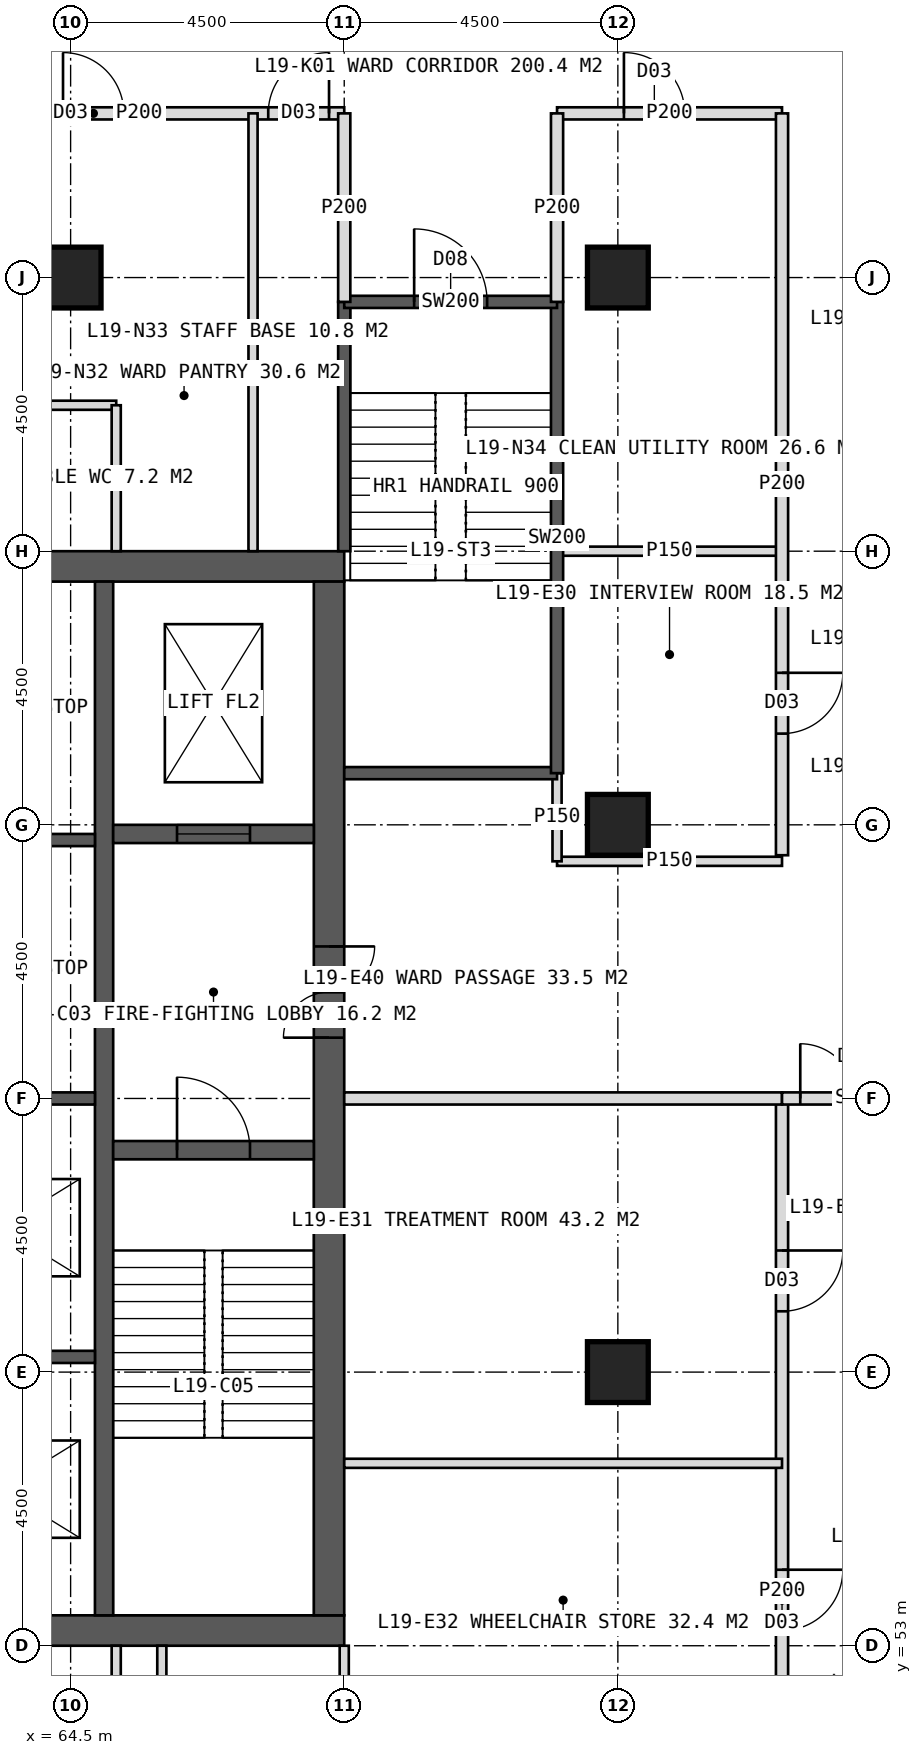
"""IFC4 building model, lengths in metres.
Left out: names, types, materials, properties, quantities, classifications, styles, units other than length and angle.
Written with IfcOpenShell. Run it as: python <this file> out.ifc"""

import sys

from ifc_helpers import new_model, si_unit, direction, frame, frame_2d, origin, origin_2d, place, context, subcontext, project, spatial, rectangle, hollow_rectangle, extrude, element, fill, save


model = new_model("IFC4")
c1 = context("Model", 3, precision=1e-05, world=origin(), true_north=direction((0.0, 1.0)))
c2 = subcontext(c1, "Body", "Model", "MODEL_VIEW")
j1 = project(units=[si_unit("LENGTHUNIT", "METRE"), si_unit("PLANEANGLEUNIT", "RADIAN")], contexts=[c1])
p1 = place(None, origin())
s1 = spatial("IfcSite", under=j1, at=p1, CompositionType="ELEMENT")
p2 = place(p1, origin())
s2 = spatial("IfcBuilding", under=s1, at=p2, CompositionType="ELEMENT")
p3 = place(p2, frame((0.0, 0.0, 83.0)))
s3 = spatial("IfcBuildingStorey", under=s2, at=p3, CompositionType="ELEMENT", Elevation=83.0)
p4 = place(p3, frame((51.0, 70.75, 0.0), z_axis=(0.0, 0.0, 1.0), x_axis=(1.0, 0.0, 0.0)))
e1 = element("IfcWall", 1, at=p4, inside=s3, PredefinedType="SHEAR", context=c2, shape_type="SweptSolid", body=[
    extrude(rectangle(XDim=18.0, YDim=0.5, at=frame_2d((9.0, 0.0))), origin(), (0.0, 0.0, 1.0), 4.0),
])
p5 = place(p4, frame((8.1, 0.0, 0.0)))
e2 = element("IfcOpeningElement", 2, at=p5, cuts=e1, PredefinedType="OPENING", context=c2, shape_type="SweptSolid", body=[
    extrude(rectangle(XDim=1.8, YDim=2.2, at=frame_2d((0.9, 1.1))), frame((0.0, 0.26, 0.0), z_axis=(0.0, -1.0, 0.0), x_axis=(1.0, 0.0, 0.0)), (0.0, 0.0, 1.0), 0.52),
])
p6 = place(p3, frame((51.0, 53.25, 0.0), z_axis=(0.0, 0.0, 1.0), x_axis=(1.0, 0.0, 0.0)))
e3 = element("IfcWall", 3, at=p6, inside=s3, PredefinedType="SHEAR", context=c2, shape_type="SweptSolid", body=[
    extrude(rectangle(XDim=18.0, YDim=0.5, at=frame_2d((9.0, 0.0))), origin(), (0.0, 0.0, 1.0), 4.0),
])
p7 = place(p6, frame((8.1, 0.0, 0.0)))
e4 = element("IfcOpeningElement", 4, at=p7, cuts=e3, PredefinedType="OPENING", context=c2, shape_type="SweptSolid", body=[
    extrude(rectangle(XDim=1.8, YDim=2.2, at=frame_2d((0.9, 1.1))), frame((0.0, 0.26, 0.0), z_axis=(0.0, -1.0, 0.0), x_axis=(1.0, 0.0, 0.0)), (0.0, 0.0, 1.0), 0.52),
])
p8 = place(p3, frame((68.75, 53.5, 0.0), z_axis=(0.0, 0.0, 1.0), x_axis=(0.0, 1.0, 0.0)))
e5 = element("IfcWall", 5, at=p8, inside=s3, PredefinedType="SHEAR", context=c2, shape_type="SweptSolid", body=[
    extrude(rectangle(XDim=17.0, YDim=0.5, at=frame_2d((8.5, 0.0))), origin(), (0.0, 0.0, 1.0), 4.0),
])
p9 = place(p8, frame((9.5, 0.0, 0.0)))
e6 = element("IfcOpeningElement", 6, at=p9, cuts=e5, PredefinedType="OPENING", context=c2, shape_type="SweptSolid", body=[
    extrude(rectangle(XDim=1.5, YDim=2.2, at=frame_2d((0.75, 1.1))), frame((0.0, 0.26, 0.0), z_axis=(0.0, -1.0, 0.0), x_axis=(1.0, 0.0, 0.0)), (0.0, 0.0, 1.0), 0.52),
])
p10 = place(p3, frame((65.05, 53.5, 0.0), z_axis=(0.0, 0.0, 1.0), x_axis=(0.0, 1.0, 0.0)))
e7 = element("IfcWall", 7, at=p10, inside=s3, PredefinedType="SHEAR", context=c2, shape_type="SweptSolid", body=[
    extrude(rectangle(XDim=17.0, YDim=0.3, at=frame_2d((8.5, 0.0))), origin(), (0.0, 0.0, 1.0), 4.0),
])
for number, where, z_axis, x_axis in (
    (8, (61.85, 57.75, 0.0), (0.0, 0.0, 1.0), (1.0, 0.0, 0.0)),
    (9, (61.85, 62.0, 0.0), (0.0, 0.0, 1.0), (1.0, 0.0, 0.0)),
    (10, (61.85, 66.25, 0.0), (0.0, 0.0, 1.0), (1.0, 0.0, 0.0)),
):
    element("IfcWall", number, at=place(p3, frame(where, z_axis=z_axis, x_axis=x_axis)), inside=s3, PredefinedType="SHEAR", context=c2, shape_type="SweptSolid", body=[
        extrude(rectangle(XDim=3.05, YDim=0.2, at=frame_2d((1.525, 0.0))), origin(), (0.0, 0.0, 1.0), 4.0),
    ])
p11 = place(p3, frame((65.2, 61.15, 0.0), z_axis=(0.0, 0.0, 1.0), x_axis=(1.0, 0.0, 0.0)))
e11 = element("IfcWall", 11, at=p11, inside=s3, PredefinedType="SHEAR", context=c2, shape_type="SweptSolid", body=[
    extrude(rectangle(XDim=3.3, YDim=0.3, at=frame_2d((1.65, 0.0))), origin(), (0.0, 0.0, 1.0), 4.0),
])
p12 = place(p11, frame((1.05, 0.0, 0.0)))
e12 = element("IfcOpeningElement", 12, at=p12, cuts=e11, PredefinedType="OPENING", context=c2, shape_type="SweptSolid", body=[
    extrude(rectangle(XDim=1.2, YDim=2.1, at=frame_2d((0.6, 1.05))), frame((0.0, 0.16, 0.0), z_axis=(0.0, -1.0, 0.0), x_axis=(1.0, 0.0, 0.0)), (0.0, 0.0, 1.0), 0.32),
])
p13 = place(p3, frame((65.2, 66.35, 0.0), z_axis=(0.0, 0.0, 1.0), x_axis=(1.0, 0.0, 0.0)))
e13 = element("IfcWall", 13, at=p13, inside=s3, PredefinedType="SHEAR", context=c2, shape_type="SweptSolid", body=[
    extrude(rectangle(XDim=3.3, YDim=0.3, at=frame_2d((1.65, 0.0))), origin(), (0.0, 0.0, 1.0), 4.0),
])
p14 = place(p13, frame((1.05, 0.0, 0.0)))
e14 = element("IfcOpeningElement", 14, at=p14, cuts=e13, PredefinedType="OPENING", context=c2, shape_type="SweptSolid", body=[
    extrude(rectangle(XDim=1.2, YDim=2.2, at=frame_2d((0.6, 1.1))), frame((0.0, 0.16, 0.0), z_axis=(0.0, -1.0, 0.0), x_axis=(1.0, 0.0, 0.0)), (0.0, 0.0, 1.0), 0.32),
])
for number, where, z_axis, x_axis in (
    (15, (73.5, 75.5, 0.0), (0.0, 0.0, 1.0), (1.0, 0.0, 0.0)),
    (16, (64.5, 75.5, 0.0), (0.0, 0.0, 1.0), (1.0, 0.0, 0.0)),
    (17, (73.5, 57.5, 0.0), (0.0, 0.0, 1.0), (1.0, 0.0, 0.0)),
    (18, (73.5, 66.5, 0.0), (0.0, 0.0, 1.0), (1.0, 0.0, 0.0)),
):
    element("IfcColumn", number, at=place(p3, frame(where, z_axis=z_axis, x_axis=x_axis)), inside=s3, PredefinedType="COLUMN", context=c2, shape_type="SweptSolid", body=[
        extrude(hollow_rectangle(XDim=1.0, YDim=1.0, WallThickness=0.1, at=origin_2d()), origin(), (0.0, 0.0, 1.0), 4.0),
    ])
p15 = place(p3, frame((62.25, 78.2, 0.0), z_axis=(0.0, 0.0, 1.0), x_axis=(1.0, 0.0, 0.0)))
e19 = element("IfcWall", 19, at=p15, inside=s3, PredefinedType="PARTITIONING", context=c2, shape_type="SweptSolid", body=[
    extrude(rectangle(XDim=6.75, YDim=0.2, at=frame_2d((3.375, 0.0))), origin(), (0.0, 0.0, 1.0), 3.75),
])
p16 = place(p15, frame((2.125, 0.0, 0.0)))
e20 = element("IfcOpeningElement", 20, at=p16, cuts=e19, PredefinedType="OPENING", context=c2, shape_type="SweptSolid", body=[
    extrude(rectangle(XDim=1.0, YDim=2.1, at=frame_2d((0.5, 1.05))), frame((0.0, 0.11, 0.0), z_axis=(0.0, -1.0, 0.0), x_axis=(1.0, 0.0, 0.0)), (0.0, 0.0, 1.0), 0.22),
])
p17 = place(p15, frame((5.5, 0.0, 0.0)))
e21 = element("IfcOpeningElement", 21, at=p17, cuts=e19, PredefinedType="OPENING", context=c2, shape_type="SweptSolid", body=[
    extrude(rectangle(XDim=1.0, YDim=2.1, at=frame_2d((0.5, 1.05))), frame((0.0, 0.11, 0.0), z_axis=(0.0, -1.0, 0.0), x_axis=(1.0, 0.0, 0.0)), (0.0, 0.0, 1.0), 0.22),
])
p18 = place(p3, frame((72.5, 78.2, 0.0), z_axis=(0.0, 0.0, 1.0), x_axis=(1.0, 0.0, 0.0)))
e22 = element("IfcWall", 22, at=p18, inside=s3, PredefinedType="PARTITIONING", context=c2, shape_type="SweptSolid", body=[
    extrude(rectangle(XDim=3.7, YDim=0.2, at=frame_2d((1.85, 0.0))), origin(), (0.0, 0.0, 1.0), 3.75),
])
p19 = place(p18, frame((1.1, 0.0, 0.0)))
e23 = element("IfcOpeningElement", 23, at=p19, cuts=e22, PredefinedType="OPENING", context=c2, shape_type="SweptSolid", body=[
    extrude(rectangle(XDim=1.0, YDim=2.1, at=frame_2d((0.5, 1.05))), frame((0.0, 0.11, 0.0), z_axis=(0.0, -1.0, 0.0), x_axis=(1.0, 0.0, 0.0)), (0.0, 0.0, 1.0), 0.22),
])
p20 = place(p3, frame((67.5, 71.0, 0.0), z_axis=(0.0, 0.0, 1.0), x_axis=(0.0, 1.0, 0.0)))
e24 = element("IfcWall", 24, at=p20, inside=s3, PredefinedType="PARTITIONING", context=c2, shape_type="SweptSolid", body=[
    extrude(rectangle(XDim=7.2, YDim=0.15, at=frame_2d((3.6, 0.0))), origin(), (0.0, 0.0, 1.0), 3.75),
])
p21 = place(p3, frame((62.25, 73.4, 0.0), z_axis=(0.0, 0.0, 1.0), x_axis=(1.0, 0.0, 0.0)))
e25 = element("IfcWall", 25, at=p21, inside=s3, PredefinedType="PARTITIONING", context=c2, shape_type="SweptSolid", body=[
    extrude(rectangle(XDim=3.0, YDim=0.15, at=frame_2d((1.5, 0.0))), origin(), (0.0, 0.0, 1.0), 3.75),
])
p22 = place(p3, frame((65.25, 71.0, 0.0), z_axis=(0.0, 0.0, 1.0), x_axis=(0.0, 1.0, 0.0)))
e26 = element("IfcWall", 26, at=p22, inside=s3, PredefinedType="PARTITIONING", context=c2, shape_type="SweptSolid", body=[
    extrude(rectangle(XDim=2.4, YDim=0.15, at=frame_2d((1.2, 0.0))), origin(), (0.0, 0.0, 1.0), 3.75),
])
for number, where, z_axis, x_axis in (
    (27, (69.0, 53.0, 0.0), (0.0, 0.0, 1.0), (0.0, -1.0, 0.0)),
    (28, (66.0, 53.0, 0.0), (0.0, 0.0, 1.0), (0.0, -1.0, 0.0)),
):
    element("IfcWall", number, at=place(p3, frame(where, z_axis=z_axis, x_axis=x_axis)), inside=s3, PredefinedType="PARTITIONING", context=c2, shape_type="SweptSolid", body=[
        extrude(rectangle(XDim=7.2, YDim=0.15, at=frame_2d((3.6, 0.0))), origin(), (0.0, 0.0, 1.0), 3.75),
    ])
p23 = place(p3, frame((65.25, 53.0, 0.0), z_axis=(0.0, 0.0, 1.0), x_axis=(0.0, -1.0, 0.0)))
e29 = element("IfcWall", 29, at=p23, inside=s3, PredefinedType="PARTITIONING", context=c2, shape_type="SweptSolid", body=[
    extrude(rectangle(XDim=2.4, YDim=0.15, at=frame_2d((1.2, 0.0))), origin(), (0.0, 0.0, 1.0), 3.75),
])
p24 = place(p3, frame((72.5, 71.0, 0.0), z_axis=(0.0, 0.0, 1.0), x_axis=(1.0, 0.0, 0.0)))
e30 = element("IfcWall", 30, at=p24, inside=s3, PredefinedType="PARTITIONING", context=c2, shape_type="SweptSolid", body=[
    extrude(rectangle(XDim=3.7, YDim=0.15, at=frame_2d((1.85, 0.0))), origin(), (0.0, 0.0, 1.0), 3.75),
])
p25 = place(p3, frame((76.2, 78.2, 0.0), z_axis=(0.0, 0.0, 1.0), x_axis=(0.0, -1.0, 0.0)))
e31 = element("IfcWall", 31, at=p25, inside=s3, PredefinedType="PARTITIONING", context=c2, shape_type="SweptSolid", body=[
    extrude(rectangle(XDim=12.2, YDim=0.2, at=frame_2d((6.1, 0.0))), origin(), (0.0, 0.0, 1.0), 3.75),
])
p26 = place(p25, frame((9.2, 0.0, 0.0)))
e32 = element("IfcOpeningElement", 32, at=p26, cuts=e31, PredefinedType="OPENING", context=c2, shape_type="SweptSolid", body=[
    extrude(rectangle(XDim=1.0, YDim=2.1, at=frame_2d((0.5, 1.05))), frame((0.0, 0.11, 0.0), z_axis=(0.0, -1.0, 0.0), x_axis=(1.0, 0.0, 0.0)), (0.0, 0.0, 1.0), 0.22),
])
p27 = place(p3, frame((76.2, 62.0, 0.0), z_axis=(0.0, 0.0, 1.0), x_axis=(0.0, -1.0, 0.0)))
e33 = element("IfcWall", 33, at=p27, inside=s3, PredefinedType="PARTITIONING", context=c2, shape_type="SweptSolid", body=[
    extrude(rectangle(XDim=16.2, YDim=0.2, at=frame_2d((8.1, 0.0))), origin(), (0.0, 0.0, 1.0), 3.75),
])
p28 = place(p27, frame((2.5, 0.0, 0.0)))
e34 = element("IfcOpeningElement", 34, at=p28, cuts=e33, PredefinedType="OPENING", context=c2, shape_type="SweptSolid", body=[
    extrude(rectangle(XDim=1.0, YDim=2.1, at=frame_2d((0.5, 1.05))), frame((0.0, 0.11, 0.0), z_axis=(0.0, -1.0, 0.0), x_axis=(1.0, 0.0, 0.0)), (0.0, 0.0, 1.0), 0.22),
])
p29 = place(p27, frame((7.75, 0.0, 0.0)))
e35 = element("IfcOpeningElement", 35, at=p29, cuts=e33, PredefinedType="OPENING", context=c2, shape_type="SweptSolid", body=[
    extrude(rectangle(XDim=1.0, YDim=2.1, at=frame_2d((0.5, 1.05))), frame((0.0, 0.11, 0.0), z_axis=(0.0, -1.0, 0.0), x_axis=(1.0, 0.0, 0.0)), (0.0, 0.0, 1.0), 0.22),
])
p30 = place(p27, frame((12.85, 0.0, 0.0)))
e36 = element("IfcOpeningElement", 36, at=p30, cuts=e33, PredefinedType="OPENING", context=c2, shape_type="SweptSolid", body=[
    extrude(rectangle(XDim=1.0, YDim=2.1, at=frame_2d((0.5, 1.05))), frame((0.0, 0.11, 0.0), z_axis=(0.0, -1.0, 0.0), x_axis=(1.0, 0.0, 0.0)), (0.0, 0.0, 1.0), 0.22),
])
p31 = place(p3, frame((72.5, 65.9, 0.0), z_axis=(0.0, 0.0, 1.0), x_axis=(1.0, 0.0, 0.0)))
e37 = element("IfcWall", 37, at=p31, inside=s3, PredefinedType="PARTITIONING", context=c2, shape_type="SweptSolid", body=[
    extrude(rectangle(XDim=3.7, YDim=0.15, at=frame_2d((1.85, 0.0))), origin(), (0.0, 0.0, 1.0), 3.75),
])
p32 = place(p3, frame((69.0, 62.0, 0.0), z_axis=(0.0, 0.0, 1.0), x_axis=(1.0, 0.0, 0.0)))
e38 = element("IfcWall", 38, at=p32, inside=s3, PredefinedType="SOLIDWALL", context=c2, shape_type="SweptSolid", body=[
    extrude(rectangle(XDim=7.2, YDim=0.2, at=frame_2d((3.6, 0.0))), origin(), (0.0, 0.0, 1.0), 2.75),
])
p33 = place(p3, frame((69.0, 56.0, 0.0), z_axis=(0.0, 0.0, 1.0), x_axis=(1.0, 0.0, 0.0)))
e39 = element("IfcWall", 39, at=p33, inside=s3, PredefinedType="PARTITIONING", context=c2, shape_type="SweptSolid", body=[
    extrude(rectangle(XDim=7.2, YDim=0.15, at=frame_2d((3.6, 0.0))), origin(), (0.0, 0.0, 1.0), 3.75),
])
p34 = place(p3, frame((76.2, 62.0, 0.0), z_axis=(0.0, 0.0, 1.0), x_axis=(1.0, 0.0, 0.0)))
e40 = element("IfcWall", 40, at=p34, inside=s3, PredefinedType="SOLIDWALL", context=c2, shape_type="SweptSolid", body=[
    extrude(rectangle(XDim=2.7, YDim=0.2, at=frame_2d((1.35, 0.0))), origin(), (0.0, 0.0, 1.0), 2.75),
])
p35 = place(p34, frame((0.3, 0.0, 0.0)))
e41 = element("IfcOpeningElement", 41, at=p35, cuts=e40, PredefinedType="OPENING", context=c2, shape_type="SweptSolid", body=[
    extrude(rectangle(XDim=1.8, YDim=2.2, at=frame_2d((0.9, 1.1))), frame((0.0, 0.11, 0.0), z_axis=(0.0, -1.0, 0.0), x_axis=(1.0, 0.0, 0.0)), (0.0, 0.0, 1.0), 0.22),
])
p36 = place(p3, frame((72.5, 65.9, 0.0), z_axis=(0.0, 0.0, 1.0), x_axis=(0.0, 1.0, 0.0)))
e42 = element("IfcWall", 42, at=p36, inside=s3, PredefinedType="PARTITIONING", context=c2, shape_type="SweptSolid", body=[
    extrude(rectangle(XDim=1.45, YDim=0.15, at=frame_2d((0.725, 0.0))), origin(), (0.0, 0.0, 1.0), 3.75),
])
p37 = place(p3, frame((69.0, 71.0, 0.0), z_axis=(0.0, 0.0, 1.0), x_axis=(0.0, 1.0, 0.0)))
e43 = element("IfcWall", 43, at=p37, inside=s3, PredefinedType="SOLIDWALL", context=c2, shape_type="SweptSolid", body=[
    extrude(rectangle(XDim=4.1, YDim=0.2, at=frame_2d((2.05, 0.0))), origin(), (0.0, 0.0, 1.0), 3.75),
])
p38 = place(p3, frame((69.0, 67.35, 0.0), z_axis=(0.0, 0.0, 1.0), x_axis=(1.0, 0.0, 0.0)))
e44 = element("IfcWall", 44, at=p38, inside=s3, PredefinedType="SOLIDWALL", context=c2, shape_type="SweptSolid", body=[
    extrude(rectangle(XDim=3.5, YDim=0.2, at=frame_2d((1.75, 0.0))), origin(), (0.0, 0.0, 1.0), 3.75),
])
p39 = place(p3, frame((72.5, 67.35, 0.0), z_axis=(0.0, 0.0, 1.0), x_axis=(0.0, 1.0, 0.0)))
e45 = element("IfcWall", 45, at=p39, inside=s3, PredefinedType="SOLIDWALL", context=c2, shape_type="SweptSolid", body=[
    extrude(rectangle(XDim=7.75, YDim=0.2, at=frame_2d((3.875, 0.0))), origin(), (0.0, 0.0, 1.0), 3.75),
])
p40 = place(p3, frame((69.0, 75.1, 0.0), z_axis=(0.0, 0.0, 1.0), x_axis=(1.0, 0.0, 0.0)))
e46 = element("IfcWall", 46, at=p40, inside=s3, PredefinedType="SOLIDWALL", context=c2, shape_type="SweptSolid", body=[
    extrude(rectangle(XDim=3.5, YDim=0.2, at=frame_2d((1.75, 0.0))), origin(), (0.0, 0.0, 1.0), 3.75),
])
p41 = place(p40, frame((1.15, 0.0, 0.0)))
e47 = element("IfcOpeningElement", 47, at=p41, cuts=e46, PredefinedType="OPENING", context=c2, shape_type="SweptSolid", body=[
    extrude(rectangle(XDim=1.2, YDim=2.1, at=frame_2d((0.6, 1.05))), frame((0.0, 0.11, 0.0), z_axis=(0.0, -1.0, 0.0), x_axis=(1.0, 0.0, 0.0)), (0.0, 0.0, 1.0), 0.22),
])
for number, where, z_axis, x_axis in (
    (48, (69.0, 75.1, 0.0), (0.0, 0.0, 1.0), (0.0, 1.0, 0.0)),
    (49, (72.5, 75.1, 0.0), (0.0, 0.0, 1.0), (0.0, 1.0, 0.0)),
):
    element("IfcWall", number, at=place(p3, frame(where, z_axis=z_axis, x_axis=x_axis)), inside=s3, PredefinedType="PARTITIONING", context=c2, shape_type="SweptSolid", body=[
        extrude(rectangle(XDim=3.1, YDim=0.2, at=frame_2d((1.55, 0.0))), origin(), (0.0, 0.0, 1.0), 3.75),
    ])
p42 = place(p16, origin())
e50 = element("IfcDoor", 50, at=p42, inside=s3, OperationType="SINGLE_SWING_LEFT", PredefinedType="DOOR", context=c2, shape_type="SweptSolid", body=[
    extrude(rectangle(XDim=1.0, YDim=2.1, at=frame_2d((0.5, 1.05))), frame((0.0, 0.025, 0.0), z_axis=(0.0, -1.0, 0.0), x_axis=(1.0, 0.0, 0.0)), (0.0, 0.0, 1.0), 0.05),
])
fill(e20, e50)
p43 = place(p17, origin())
e51 = element("IfcDoor", 51, at=p43, inside=s3, OperationType="SINGLE_SWING_RIGHT", PredefinedType="DOOR", context=c2, shape_type="SweptSolid", body=[
    extrude(rectangle(XDim=1.0, YDim=2.1, at=frame_2d((0.5, 1.05))), frame((0.0, 0.025, 0.0), z_axis=(0.0, -1.0, 0.0), x_axis=(1.0, 0.0, 0.0)), (0.0, 0.0, 1.0), 0.05),
])
fill(e21, e51)
p44 = place(p19, origin())
e52 = element("IfcDoor", 52, at=p44, inside=s3, OperationType="SINGLE_SWING_LEFT", PredefinedType="DOOR", context=c2, shape_type="SweptSolid", body=[
    extrude(rectangle(XDim=1.0, YDim=2.1, at=frame_2d((0.5, 1.05))), frame((0.0, 0.025, 0.0), z_axis=(0.0, -1.0, 0.0), x_axis=(1.0, 0.0, 0.0)), (0.0, 0.0, 1.0), 0.05),
])
fill(e23, e52)
p45 = place(p26, origin())
e53 = element("IfcDoor", 53, at=p45, inside=s3, OperationType="SINGLE_SWING_LEFT", PredefinedType="DOOR", context=c2, shape_type="SweptSolid", body=[
    extrude(rectangle(XDim=1.0, YDim=2.1, at=frame_2d((0.5, 1.05))), frame((0.0, 0.025, 0.0), z_axis=(0.0, -1.0, 0.0), x_axis=(1.0, 0.0, 0.0)), (0.0, 0.0, 1.0), 0.05),
])
fill(e32, e53)
p46 = place(p28, origin())
e54 = element("IfcDoor", 54, at=p46, inside=s3, OperationType="SINGLE_SWING_LEFT", PredefinedType="DOOR", context=c2, shape_type="SweptSolid", body=[
    extrude(rectangle(XDim=1.0, YDim=2.1, at=frame_2d((0.5, 1.05))), frame((0.0, 0.025, 0.0), z_axis=(0.0, -1.0, 0.0), x_axis=(1.0, 0.0, 0.0)), (0.0, 0.0, 1.0), 0.05),
])
fill(e34, e54)
p47 = place(p29, origin())
e55 = element("IfcDoor", 55, at=p47, inside=s3, OperationType="SINGLE_SWING_LEFT", PredefinedType="DOOR", context=c2, shape_type="SweptSolid", body=[
    extrude(rectangle(XDim=1.0, YDim=2.1, at=frame_2d((0.5, 1.05))), frame((0.0, 0.025, 0.0), z_axis=(0.0, -1.0, 0.0), x_axis=(1.0, 0.0, 0.0)), (0.0, 0.0, 1.0), 0.05),
])
fill(e35, e55)
p48 = place(p35, origin())
e56 = element("IfcDoor", 56, at=p48, inside=s3, OperationType="DOUBLE_DOOR_DOUBLE_SWING", PredefinedType="DOOR", context=c2, shape_type="SweptSolid", body=[
    extrude(rectangle(XDim=1.8, YDim=2.2, at=frame_2d((0.9, 1.1))), frame((0.0, 0.025, 0.0), z_axis=(0.0, -1.0, 0.0), x_axis=(1.0, 0.0, 0.0)), (0.0, 0.0, 1.0), 0.05),
])
fill(e41, e56)
p49 = place(p9, origin())
e57 = element("IfcDoor", 57, at=p49, inside=s3, OperationType="DOUBLE_DOOR_SINGLE_SWING", PredefinedType="DOOR", context=c2, shape_type="SweptSolid", body=[
    extrude(rectangle(XDim=1.5, YDim=2.2, at=frame_2d((0.75, 1.1))), frame((0.0, 0.025, 0.0), z_axis=(0.0, -1.0, 0.0), x_axis=(1.0, 0.0, 0.0)), (0.0, 0.0, 1.0), 0.05),
])
fill(e6, e57)
p50 = place(p12, origin())
e58 = element("IfcDoor", 58, at=p50, inside=s3, OperationType="SINGLE_SWING_LEFT", PredefinedType="DOOR", context=c2, shape_type="SweptSolid", body=[
    extrude(rectangle(XDim=1.2, YDim=2.1, at=frame_2d((0.6, 1.05))), frame((0.0, 0.025, 0.0), z_axis=(0.0, -1.0, 0.0), x_axis=(1.0, 0.0, 0.0)), (0.0, 0.0, 1.0), 0.05),
])
fill(e12, e58)
p51 = place(p14, origin())
e59 = element("IfcDoor", 59, at=p51, inside=s3, OperationType="SLIDING_TO_LEFT", PredefinedType="DOOR", context=c2, shape_type="SweptSolid", body=[
    extrude(rectangle(XDim=1.2, YDim=2.2, at=frame_2d((0.6, 1.1))), frame((0.0, 0.025, 0.0), z_axis=(0.0, -1.0, 0.0), x_axis=(1.0, 0.0, 0.0)), (0.0, 0.0, 1.0), 0.05),
])
fill(e14, e59)
p52 = place(p41, origin())
e60 = element("IfcDoor", 60, at=p52, inside=s3, OperationType="SINGLE_SWING_LEFT", PredefinedType="DOOR", context=c2, shape_type="SweptSolid", body=[
    extrude(rectangle(XDim=1.2, YDim=2.1, at=frame_2d((0.6, 1.05))), frame((0.0, 0.025, 0.0), z_axis=(0.0, -1.0, 0.0), x_axis=(1.0, 0.0, 0.0)), (0.0, 0.0, 1.0), 0.05),
])
fill(e47, e60)
save(model, sys.argv[1])
